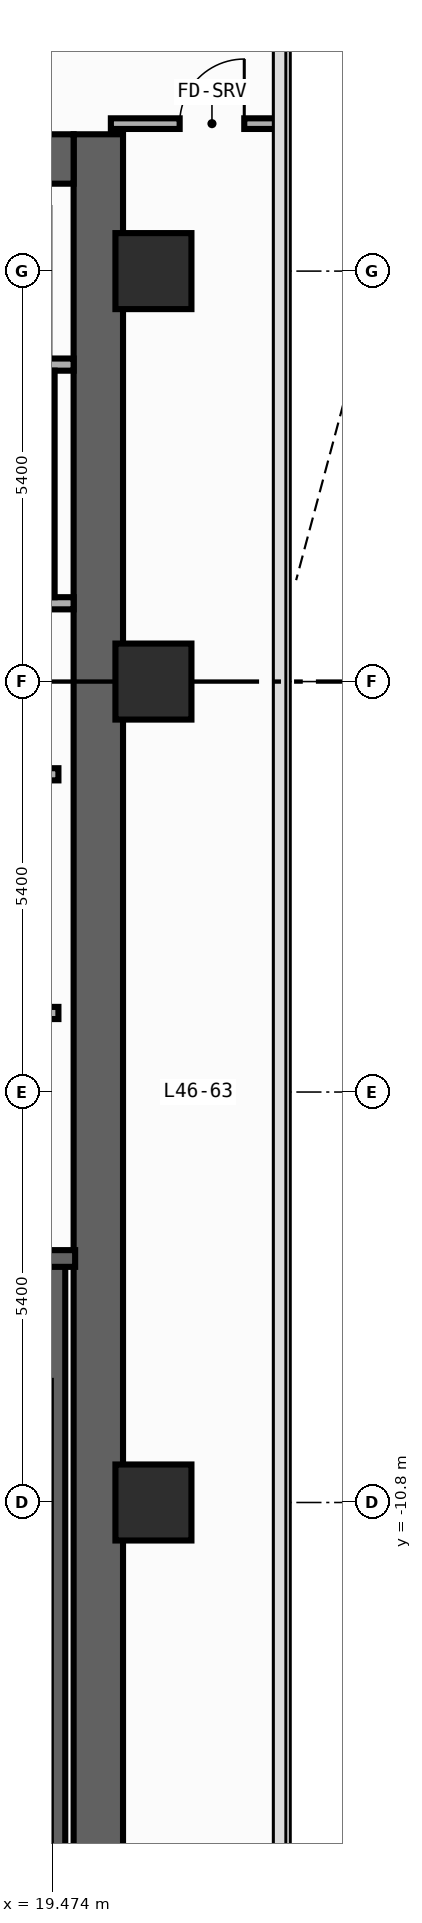
"""IFC4 building model, lengths in metres.
Left out: names, types, materials, properties, quantities, classifications, styles, units other than length and angle.
Written with IfcOpenShell. Run it as: python <this file> out.ifc"""

import sys

from ifc_helpers import new_model, si_unit, direction, frame, frame_2d, origin, origin_2d, place, context, subcontext, project, spatial, rectangle, extrude, element, fill, save


model = new_model("IFC4")
c1 = context("Model", 3, precision=1e-05, world=origin(), true_north=direction((0.0, 1.0)))
c2 = subcontext(c1, "Body", "Model", "MODEL_VIEW")
j1 = project(units=[si_unit("LENGTHUNIT", "METRE"), si_unit("PLANEANGLEUNIT", "RADIAN")], contexts=[c1])
p1 = place(None, origin())
s1 = spatial("IfcSite", under=j1, at=p1, CompositionType="ELEMENT")
p2 = place(p1, origin())
s2 = spatial("IfcBuilding", under=s1, at=p2, CompositionType="ELEMENT")
p3 = place(p2, frame((0.0, 0.0, 199.2)))
s3 = spatial("IfcBuildingStorey", under=s2, at=p3, CompositionType="ELEMENT", Elevation=199.2)
p4 = place(p3, frame((20.075, -19.8, 0.0), z_axis=(0.0, 0.0, 1.0), x_axis=(0.0, 1.0, 0.0)))
e1 = element("IfcWall", 1, at=p4, inside=s3, PredefinedType="SHEAR", context=c2, shape_type="SweptSolid", body=[
    extrude(rectangle(XDim=27.0, YDim=0.65, at=frame_2d((13.5, 0.0))), origin(), (0.0, 0.0, 1.0), 3.54),
])
p5 = place(p3, frame((12.65, 6.875, 0.0), z_axis=(0.0, 0.0, 1.0), x_axis=(1.0, 0.0, 0.0)))
e2 = element("IfcWall", 2, at=p5, inside=s3, PredefinedType="SHEAR", context=c2, shape_type="SweptSolid", body=[
    extrude(rectangle(XDim=7.1, YDim=0.65, at=frame_2d((3.55, 0.0))), origin(), (0.0, 0.0, 1.0), 3.54),
])
p6 = place(p3, frame((19.53, -19.01, 0.0), z_axis=(0.0, 0.0, 1.0), x_axis=(0.0, 1.0, 0.0)))
e3 = element("IfcWall", 3, at=p6, inside=s3, PredefinedType="SHEAR", context=c2, shape_type="SweptSolid", body=[
    extrude(rectangle(XDim=11.42, YDim=0.22, at=frame_2d((5.71, 0.0))), origin(), (0.0, 0.0, 1.0), 3.54),
])
p7 = place(p3, frame((19.77, -7.59, 0.0), z_axis=(0.0, 0.0, 1.0), x_axis=(-1.0, 0.0, 0.0)))
e4 = element("IfcWall", 4, at=p7, inside=s3, PredefinedType="SHEAR", context=c2, shape_type="SweptSolid", body=[
    extrude(rectangle(XDim=4.065, YDim=0.22, at=frame_2d((2.032, 0.0))), origin(), (0.0, 0.0, 1.0), 3.54),
])
p8 = place(p7, frame((1.08, 0.0, 0.0)))
e5 = element("IfcOpeningElement", 5, at=p8, cuts=e4, PredefinedType="OPENING", context=c2, shape_type="SweptSolid", body=[
    extrude(rectangle(XDim=1.1, YDim=2.2, at=frame_2d((0.55, 1.1))), frame((0.0, 0.12, 0.0), z_axis=(0.0, -1.0, 0.0), x_axis=(1.0, 0.0, 0.0)), (0.0, 0.0, 1.0), 0.24),
])
for number, where, z_axis, x_axis in (
    (6, (20.8, -10.8, 0.0), (0.0, 0.0, 1.0), (1.0, 0.0, 0.0)),
    (7, (20.8, 0.0, 0.0), (0.0, 0.0, 1.0), (1.0, 0.0, 0.0)),
    (8, (20.8, 5.4, 0.0), (0.0, 0.0, 1.0), (1.0, 0.0, 0.0)),
):
    element("IfcColumn", number, at=place(p3, frame(where, z_axis=z_axis, x_axis=x_axis)), inside=s3, PredefinedType="COLUMN", context=c2, shape_type="SweptSolid", body=[
        extrude(rectangle(XDim=1.0, YDim=1.0, at=origin_2d()), origin(), (0.0, 0.0, 1.0), 3.8),
    ])
p9 = place(p3, frame((15.75, -4.36, 0.0), z_axis=(0.0, 0.0, 1.0), x_axis=(1.0, 0.0, 0.0)))
e9 = element("IfcWall", 9, at=p9, inside=s3, PredefinedType="STANDARD", context=c2, shape_type="SweptSolid", body=[
    extrude(rectangle(XDim=3.8, YDim=0.16, at=frame_2d((1.9, 0.0))), origin(), (0.0, 0.0, 1.0), 3.54),
])
p10 = place(p9, frame((1.47, 0.0, 0.0)))
e10 = element("IfcOpeningElement", 10, at=p10, cuts=e9, PredefinedType="OPENING", context=c2, shape_type="SweptSolid", body=[
    extrude(rectangle(XDim=1.15, YDim=2.2, at=frame_2d((0.575, 1.1))), frame((0.0, 0.09, 0.0), z_axis=(0.0, -1.0, 0.0), x_axis=(1.0, 0.0, 0.0)), (0.0, 0.0, 1.0), 0.18),
])
p11 = place(p3, frame((15.75, -1.22, 0.0), z_axis=(0.0, 0.0, 1.0), x_axis=(1.0, 0.0, 0.0)))
e11 = element("IfcWall", 11, at=p11, inside=s3, PredefinedType="STANDARD", context=c2, shape_type="SweptSolid", body=[
    extrude(rectangle(XDim=3.8, YDim=0.16, at=frame_2d((1.9, 0.0))), origin(), (0.0, 0.0, 1.0), 3.54),
])
for number, where, z_axis, x_axis in (
    (12, (17.31, 4.17, 0.0), (0.0, 0.0, 1.0), (1.0, 0.0, 0.0)),
    (13, (17.31, 1.03, 0.0), (0.0, 0.0, 1.0), (1.0, 0.0, 0.0)),
):
    element("IfcWall", number, at=place(p3, frame(where, z_axis=z_axis, x_axis=x_axis)), inside=s3, PredefinedType="PARTITIONING", context=c2, shape_type="SweptSolid", body=[
        extrude(rectangle(XDim=2.44, YDim=0.16, at=frame_2d((1.22, 0.0))), origin(), (0.0, 0.0, 1.0), 3.54),
    ])
p12 = place(p3, frame((20.24, 7.34, 0.0), z_axis=(0.0, 0.0, 1.0), x_axis=(1.0, 0.0, 0.0)))
e14 = element("IfcWall", 14, at=p12, inside=s3, PredefinedType="PARTITIONING", context=c2, shape_type="SweptSolid", body=[
    extrude(rectangle(XDim=2.215, YDim=0.14, at=frame_2d((1.107, 0.0))), origin(), (0.0, 0.0, 1.0), 3.54),
])
p13 = place(p12, frame((0.905, 0.0, 0.0)))
e15 = element("IfcOpeningElement", 15, at=p13, cuts=e14, PredefinedType="OPENING", context=c2, shape_type="SweptSolid", body=[
    extrude(rectangle(XDim=0.85, YDim=2.1, at=frame_2d((0.425, 1.05))), frame((0.0, 0.08, 0.0), z_axis=(0.0, -1.0, 0.0), x_axis=(1.0, 0.0, 0.0)), (0.0, 0.0, 1.0), 0.16),
])
p14 = place(p3, frame((19.45, 4.09, 0.0), z_axis=(0.0, 0.0, 1.0), x_axis=(0.0, -1.0, 0.0)))
e16 = element("IfcWall", 16, at=p14, inside=s3, PredefinedType="PARTITIONING", context=c2, shape_type="SweptSolid", body=[
    extrude(rectangle(XDim=2.98, YDim=0.1, at=frame_2d((1.49, 0.0))), origin(), (0.0, 0.0, 1.0), 3.54),
])
p15 = place(p13, origin())
e17 = element("IfcDoor", 17, at=p15, inside=s3, OperationType="SINGLE_SWING_RIGHT", PredefinedType="DOOR", context=c2, shape_type="SweptSolid", body=[
    extrude(rectangle(XDim=0.85, YDim=2.1, at=frame_2d((0.425, 1.05))), frame((0.0, 0.025, 0.0), z_axis=(0.0, -1.0, 0.0), x_axis=(1.0, 0.0, 0.0)), (0.0, 0.0, 1.0), 0.05),
])
fill(e15, e17)
save(model, sys.argv[1])
